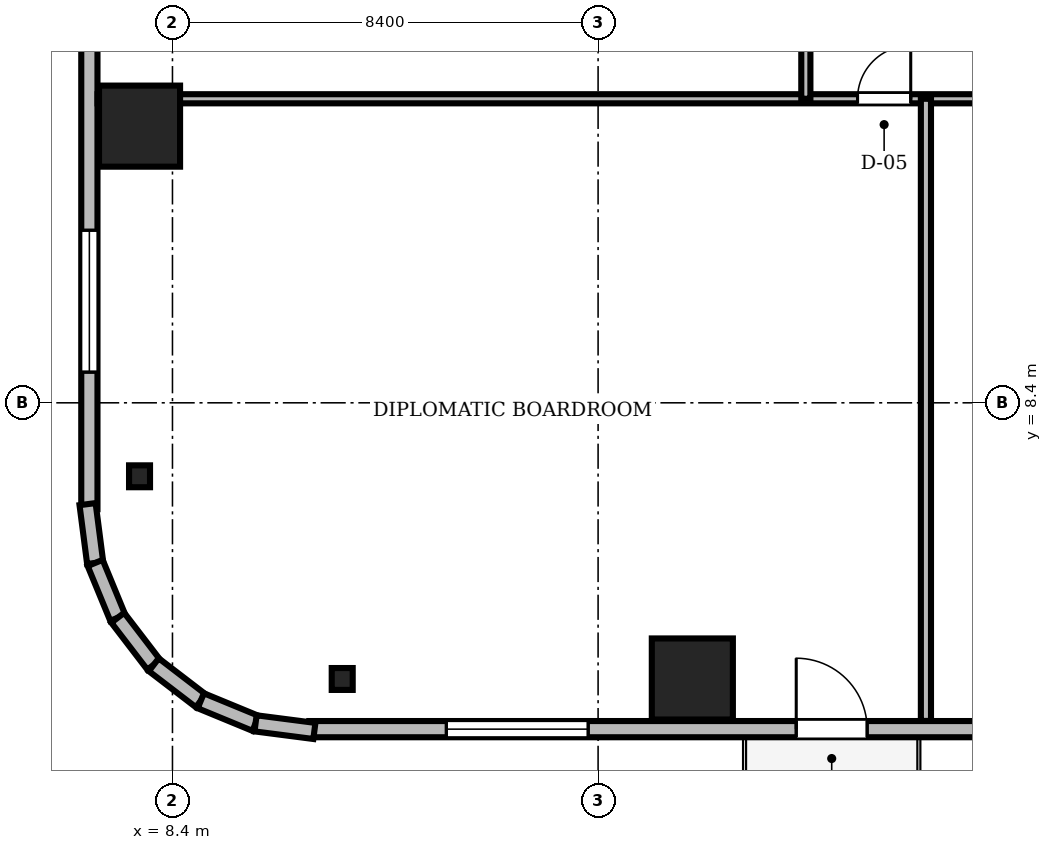
"""IFC4 building model, lengths in metres.
Left out: names, types, materials, properties, quantities, classifications, styles, units other than length and angle.
Written with IfcOpenShell. Run it as: python <this file> out.ifc"""

import sys

from ifc_helpers import new_model, si_unit, direction, frame, frame_2d, origin, origin_2d, place, context, subcontext, project, spatial, rectangle, i_section, extrude, source, transform, mapped, element, fill, save


model = new_model("IFC4")
c1 = context("Model", 3, precision=1e-05, world=origin(), true_north=direction((0.0, 1.0)))
c2 = subcontext(c1, "Body", "Model", "MODEL_VIEW")
j1 = project(units=[si_unit("LENGTHUNIT", "METRE"), si_unit("PLANEANGLEUNIT", "RADIAN")], contexts=[c1])
p1 = place(None, origin())
s1 = spatial("IfcSite", under=j1, at=p1, CompositionType="ELEMENT")
p2 = place(p1, origin())
s2 = spatial("IfcBuilding", under=s1, at=p2, CompositionType="ELEMENT")
p3 = place(p2, frame((0.0, 0.0, 140.9)))
s3 = spatial("IfcBuildingStorey", under=s2, at=p3, CompositionType="ELEMENT", Elevation=140.9)
m1 = source(origin(), c2, "Body", "SweptSolid", [
    extrude(rectangle(XDim=1.6, YDim=1.6, at=origin_2d()), origin(), (0.0, 0.0, 1.0), 3.46),
])
for number, where, z_axis, x_axis in (
    (1, (18.66, 2.95, 0.0), (0.0, 0.0, 1.0), (1.0, 0.0, 0.0)),
    (2, (7.75, 13.86, 0.0), (0.0, 0.0, 1.0), (1.0, 0.0, 0.0)),
):
    element("IfcColumn", number, at=place(p3, frame(where, z_axis=z_axis, x_axis=x_axis)), inside=s3, PredefinedType="COLUMN", context=c2, shape_type="MappedRepresentation", body=[
        mapped(m1, transform((0.0, 0.0, 0.0), scale=1.0)),
    ])
m2 = source(origin(), c2, "Body", "SweptSolid", [
    extrude(i_section(OverallWidth=0.414, OverallDepth=0.432, WebThickness=0.026, FlangeThickness=0.04, FilletRadius=0.015, at=origin_2d()), origin(), (0.0, 0.0, 1.0), 3.46),
])
for number, where, z_axis, x_axis in (
    (3, (11.75, 2.95, 0.0), (0.0, 0.0, 1.0), (1.0, 0.0, 0.0)),
    (4, (7.75, 6.95, 0.0), (0.0, 0.0, 1.0), (1.0, 0.0, 0.0)),
):
    element("IfcColumn", number, at=place(p3, frame(where, z_axis=z_axis, x_axis=x_axis)), inside=s3, PredefinedType="COLUMN", context=c2, shape_type="MappedRepresentation", body=[
        mapped(m2, transform((0.0, 0.0, 0.0), scale=1.0)),
    ])
m3 = source(origin(), c2, "Body", "SweptSolid", [
    extrude(rectangle(XDim=15.6, YDim=0.32, at=frame_2d((7.8, 0.0))), origin(), (0.0, 0.0, 1.0), 3.46),
])
p4 = place(p3, frame((11.1, 1.96, 0.0), z_axis=(0.0, 0.0, 1.0), x_axis=(1.0, 0.0, 0.0)))
e5 = element("IfcWall", 5, at=p4, inside=s3, PredefinedType="SOLIDWALL", context=c2, shape_type="MappedRepresentation", body=[
    mapped(m3, transform((0.0, 0.0, 0.0), scale=1.0)),
])
m4 = source(origin(), c2, "Body", "SweptSolid", [
    extrude(rectangle(XDim=1.4, YDim=2.3, at=frame_2d((0.7, 1.15))), frame((0.0, 0.17, 0.0), z_axis=(0.0, -1.0, 0.0), x_axis=(1.0, 0.0, 0.0)), (0.0, 0.0, 1.0), 0.34),
])
p5 = place(p4, frame((9.61, 0.0, 0.0)))
e6 = element("IfcOpeningElement", 6, at=p5, cuts=e5, PredefinedType="OPENING", context=c2, shape_type="MappedRepresentation", body=[
    mapped(m4, transform((0.0, 0.0, 0.0), scale=1.0)),
])
m5 = source(origin(), c2, "Body", "SweptSolid", [
    extrude(rectangle(XDim=2.8, YDim=2.4, at=frame_2d((1.4, 1.2))), frame((0.0, 0.17, 0.0), z_axis=(0.0, -1.0, 0.0), x_axis=(1.0, 0.0, 0.0)), (0.0, 0.0, 1.0), 0.34),
])
p6 = place(p4, frame((2.705, 0.0, 0.72)))
e7 = element("IfcOpeningElement", 7, at=p6, cuts=e5, PredefinedType="OPENING", context=c2, shape_type="MappedRepresentation", body=[
    mapped(m5, transform((0.0, 0.0, 0.0), scale=1.0)),
])
p7 = place(p3, frame((6.76, 21.9, 0.0), z_axis=(0.0, 0.0, 1.0), x_axis=(0.0, -1.0, 0.0)))
e8 = element("IfcWall", 8, at=p7, inside=s3, PredefinedType="SOLIDWALL", context=c2, shape_type="MappedRepresentation", body=[
    mapped(m3, transform((0.0, 0.0, 0.0), scale=1.0)),
])
p8 = place(p7, frame((10.095, 0.0, 0.72)))
e9 = element("IfcOpeningElement", 9, at=p8, cuts=e8, PredefinedType="OPENING", context=c2, shape_type="MappedRepresentation", body=[
    mapped(m5, transform((0.0, 0.0, 0.0), scale=1.0)),
])
m6 = source(origin(), c2, "Body", "SweptSolid", [
    extrude(rectangle(XDim=1.171, YDim=0.32, at=frame_2d((0.585, 0.0))), origin(), (0.0, 0.0, 1.0), 3.46),
])
p9 = place(p3, frame((6.724, 6.401, 0.0), z_axis=(0.0, 0.0, 1.0), x_axis=(0.128269133229, -0.991739395941, 0.0)))
e10 = element("IfcWall", 10, at=p9, inside=s3, PredefinedType="SOLIDWALL", context=c2, shape_type="MappedRepresentation", body=[
    mapped(m6, transform((0.0, 0.0, 0.0), scale=1.0)),
])
m7 = source(origin(), c2, "Body", "SweptSolid", [
    extrude(rectangle(XDim=1.169, YDim=0.32, at=frame_2d((0.584, 0.0))), origin(), (0.0, 0.0, 1.0), 3.46),
])
for number, where, z_axis, x_axis in (
    (11, (6.875, 5.24, 0.0), (0.0, 0.0, 1.0), (0.381, -0.925, 0.0)),
    (12, (7.32, 4.159, 0.0), (0.0, 0.0, 1.0), (0.608, -0.794, 0.0)),
):
    element("IfcWall", number, at=place(p3, frame(where, z_axis=z_axis, x_axis=x_axis)), inside=s3, PredefinedType="SOLIDWALL", context=c2, shape_type="MappedRepresentation", body=[
        mapped(m7, transform((0.0, 0.0, 0.0), scale=1.0)),
    ])
m8 = source(origin(), c2, "Body", "SweptSolid", [
    extrude(rectangle(XDim=1.169, YDim=0.32, at=frame_2d((0.584, 0.0))), origin(), (0.0, 0.0, 1.0), 3.46),
])
p10 = place(p3, frame((8.031, 3.231, 0.0), z_axis=(0.0, 0.0, 1.0), x_axis=(0.793663520347, -0.608356981114, 0.0)))
e13 = element("IfcWall", 13, at=p10, inside=s3, PredefinedType="SOLIDWALL", context=c2, shape_type="MappedRepresentation", body=[
    mapped(m8, transform((0.0, 0.0, 0.0), scale=1.0)),
])
m9 = source(origin(), c2, "Body", "SweptSolid", [
    extrude(rectangle(XDim=1.169, YDim=0.32, at=frame_2d((0.585, 0.0))), origin(), (0.0, 0.0, 1.0), 3.46),
])
p11 = place(p3, frame((8.959, 2.52, 0.0), z_axis=(0.0, 0.0, 1.0), x_axis=(0.924479075121, -0.381232789334, 0.0)))
e14 = element("IfcWall", 14, at=p11, inside=s3, PredefinedType="SOLIDWALL", context=c2, shape_type="MappedRepresentation", body=[
    mapped(m9, transform((0.0, 0.0, 0.0), scale=1.0)),
])
m10 = source(origin(), c2, "Body", "SweptSolid", [
    extrude(rectangle(XDim=1.17, YDim=0.32, at=frame_2d((0.585, 0.0))), origin(), (0.0, 0.0, 1.0), 3.46),
])
p12 = place(p3, frame((10.04, 2.074, 0.0), z_axis=(0.0, 0.0, 1.0), x_axis=(0.991762485493, -0.128090485085, 0.0)))
e15 = element("IfcWall", 15, at=p12, inside=s3, PredefinedType="SOLIDWALL", context=c2, shape_type="MappedRepresentation", body=[
    mapped(m10, transform((0.0, 0.0, 0.0), scale=1.0)),
])
m11 = source(origin(), c2, "Body", "SweptSolid", [
    extrude(rectangle(XDim=46.156, YDim=0.18, at=frame_2d((23.078, 0.0))), origin(), (0.0, 0.0, 1.0), 2.702),
])
p13 = place(p3, frame((6.922, 14.4, 0.0), z_axis=(0.0, 0.0, 1.0), x_axis=(1.0, 0.0, 0.0)))
e16 = element("IfcWall", 16, at=p13, inside=s3, PredefinedType="PARTITIONING", context=c2, shape_type="MappedRepresentation", body=[
    mapped(m11, transform((0.0, 0.0, 0.0), scale=1.0)),
])
m12 = source(origin(), c2, "Body", "SweptSolid", [
    extrude(rectangle(XDim=1.05, YDim=2.2, at=frame_2d((0.525, 1.1))), frame((0.0, 0.1, 0.0), z_axis=(0.0, -1.0, 0.0), x_axis=(1.0, 0.0, 0.0)), (0.0, 0.0, 1.0), 0.2),
])
p14 = place(p13, frame((14.998, 0.0, 0.0)))
e17 = element("IfcOpeningElement", 17, at=p14, cuts=e16, PredefinedType="OPENING", context=c2, shape_type="MappedRepresentation", body=[
    mapped(m12, transform((0.0, 0.0, 0.0), scale=1.0)),
])
p15 = place(p13, frame((17.553, 0.0, 0.0)))
e18 = element("IfcOpeningElement", 18, at=p15, cuts=e16, PredefinedType="OPENING", context=c2, shape_type="MappedRepresentation", body=[
    mapped(m12, transform((0.0, 0.0, 0.0), scale=1.0)),
])
p16 = place(p13, frame((21.003, 0.0, 0.0)))
e19 = element("IfcOpeningElement", 19, at=p16, cuts=e16, PredefinedType="OPENING", context=c2, shape_type="MappedRepresentation", body=[
    mapped(m12, transform((0.0, 0.0, 0.0), scale=1.0)),
])
p17 = place(p13, frame((24.532, 0.0, 0.0)))
e20 = element("IfcOpeningElement", 20, at=p17, cuts=e16, PredefinedType="OPENING", context=c2, shape_type="MappedRepresentation", body=[
    mapped(m12, transform((0.0, 0.0, 0.0), scale=1.0)),
])
p18 = place(p13, frame((28.338, 0.0, 0.0)))
e21 = element("IfcOpeningElement", 21, at=p18, cuts=e16, PredefinedType="OPENING", context=c2, shape_type="MappedRepresentation", body=[
    mapped(m12, transform((0.0, 0.0, 0.0), scale=1.0)),
])
p19 = place(p13, frame((32.341, 0.0, 0.0)))
e22 = element("IfcOpeningElement", 22, at=p19, cuts=e16, PredefinedType="OPENING", context=c2, shape_type="MappedRepresentation", body=[
    mapped(m12, transform((0.0, 0.0, 0.0), scale=1.0)),
])
p20 = place(p13, frame((37.094, 0.0, 0.0)))
e23 = element("IfcOpeningElement", 23, at=p20, cuts=e16, PredefinedType="OPENING", context=c2, shape_type="MappedRepresentation", body=[
    mapped(m12, transform((0.0, 0.0, 0.0), scale=1.0)),
])
p21 = place(p13, frame((41.828, 0.0, 0.0)))
e24 = element("IfcOpeningElement", 24, at=p21, cuts=e16, PredefinedType="OPENING", context=c2, shape_type="MappedRepresentation", body=[
    mapped(m12, transform((0.0, 0.0, 0.0), scale=1.0)),
])
m13 = source(origin(), c2, "Body", "SweptSolid", [
    extrude(rectangle(XDim=14.15, YDim=0.18, at=frame_2d((7.075, 0.0))), origin(), (0.0, 0.0, 1.0), 2.852),
])
p22 = place(p3, frame((20.9, 14.4, 0.0), z_axis=(0.0, 0.0, 1.0), x_axis=(0.0, 1.0, 0.0)))
e25 = element("IfcWall", 25, at=p22, inside=s3, PredefinedType="PARTITIONING", context=c2, shape_type="MappedRepresentation", body=[
    mapped(m13, transform((0.0, 0.0, 0.0), scale=1.0)),
])
p23 = place(p22, frame((1.813, 0.0, 0.0)))
e26 = element("IfcOpeningElement", 26, at=p23, cuts=e25, PredefinedType="OPENING", context=c2, shape_type="MappedRepresentation", body=[
    mapped(m12, transform((0.0, 0.0, 0.0), scale=1.0)),
])
m14 = source(origin(), c2, "Body", "SweptSolid", [
    extrude(rectangle(XDim=0.95, YDim=2.15, at=frame_2d((0.475, 1.075))), frame((0.0, 0.1, 0.0), z_axis=(0.0, -1.0, 0.0), x_axis=(1.0, 0.0, 0.0)), (0.0, 0.0, 1.0), 0.2),
])
p24 = place(p22, frame((7.705, 0.0, 0.0)))
e27 = element("IfcOpeningElement", 27, at=p24, cuts=e25, PredefinedType="OPENING", context=c2, shape_type="MappedRepresentation", body=[
    mapped(m14, transform((0.0, 0.0, 0.0), scale=1.0)),
])
p25 = place(p22, frame((11.146, 0.0, 0.0)))
e28 = element("IfcOpeningElement", 28, at=p25, cuts=e25, PredefinedType="OPENING", context=c2, shape_type="MappedRepresentation", body=[
    mapped(m12, transform((0.0, 0.0, 0.0), scale=1.0)),
])
m15 = source(origin(), c2, "Body", "SweptSolid", [
    extrude(rectangle(XDim=12.278, YDim=0.2, at=frame_2d((6.139, 0.0))), origin(), (0.0, 0.0, 1.0), 2.702),
])
p26 = place(p3, frame((23.27, 2.122, 0.0), z_axis=(0.0, 0.0, 1.0), x_axis=(0.0, 1.0, 0.0)))
e29 = element("IfcWall", 29, at=p26, inside=s3, PredefinedType="PARTITIONING", context=c2, shape_type="MappedRepresentation", body=[
    mapped(m15, transform((0.0, 0.0, 0.0), scale=1.0)),
])
m16 = source(origin(), c2, "Body", "SweptSolid", [
    extrude(rectangle(XDim=1.4, YDim=2.3, at=frame_2d((0.7, 1.15))), frame((0.0, 0.025, 0.0), z_axis=(0.0, -1.0, 0.0), x_axis=(1.0, 0.0, 0.0)), (0.0, 0.0, 1.0), 0.05),
])
p27 = place(p5, frame((1.4, 0.0, 0.0), z_axis=(0.0, 0.0, 1.0), x_axis=(-1.0, 0.0, 0.0)))
e30 = element("IfcDoor", 30, at=p27, inside=s3, OperationType="DOUBLE_DOOR_SLIDING", PredefinedType="DOOR", context=c2, shape_type="MappedRepresentation", body=[
    mapped(m16, transform((0.0, 0.0, 0.0), scale=1.0)),
])
fill(e6, e30)
m17 = source(origin(), c2, "Body", "SweptSolid", [
    extrude(rectangle(XDim=2.8, YDim=2.4, at=frame_2d((1.4, 1.2))), frame((0.0, 0.03, 0.0), z_axis=(0.0, -1.0, 0.0), x_axis=(1.0, 0.0, 0.0)), (0.0, 0.0, 1.0), 0.06),
])
p28 = place(p6, origin())
e31 = element("IfcWindow", 31, at=p28, inside=s3, PartitioningType="SINGLE_PANEL", PredefinedType="WINDOW", context=c2, shape_type="MappedRepresentation", body=[
    mapped(m17, transform((0.0, 0.0, 0.0), scale=1.0)),
])
fill(e7, e31)
p29 = place(p8, origin())
e32 = element("IfcWindow", 32, at=p29, inside=s3, PartitioningType="SINGLE_PANEL", PredefinedType="WINDOW", context=c2, shape_type="MappedRepresentation", body=[
    mapped(m17, transform((0.0, 0.0, 0.0), scale=1.0)),
])
fill(e9, e32)
m18 = source(origin(), c2, "Body", "SweptSolid", [
    extrude(rectangle(XDim=1.05, YDim=2.2, at=frame_2d((0.525, 1.1))), frame((0.0, 0.025, 0.0), z_axis=(0.0, -1.0, 0.0), x_axis=(1.0, 0.0, 0.0)), (0.0, 0.0, 1.0), 0.05),
])
p30 = place(p14, origin())
e33 = element("IfcDoor", 33, at=p30, inside=s3, OperationType="SINGLE_SWING_RIGHT", PredefinedType="DOOR", context=c2, shape_type="MappedRepresentation", body=[
    mapped(m18, transform((0.0, 0.0, 0.0), scale=1.0)),
])
fill(e17, e33)
save(model, sys.argv[1])
